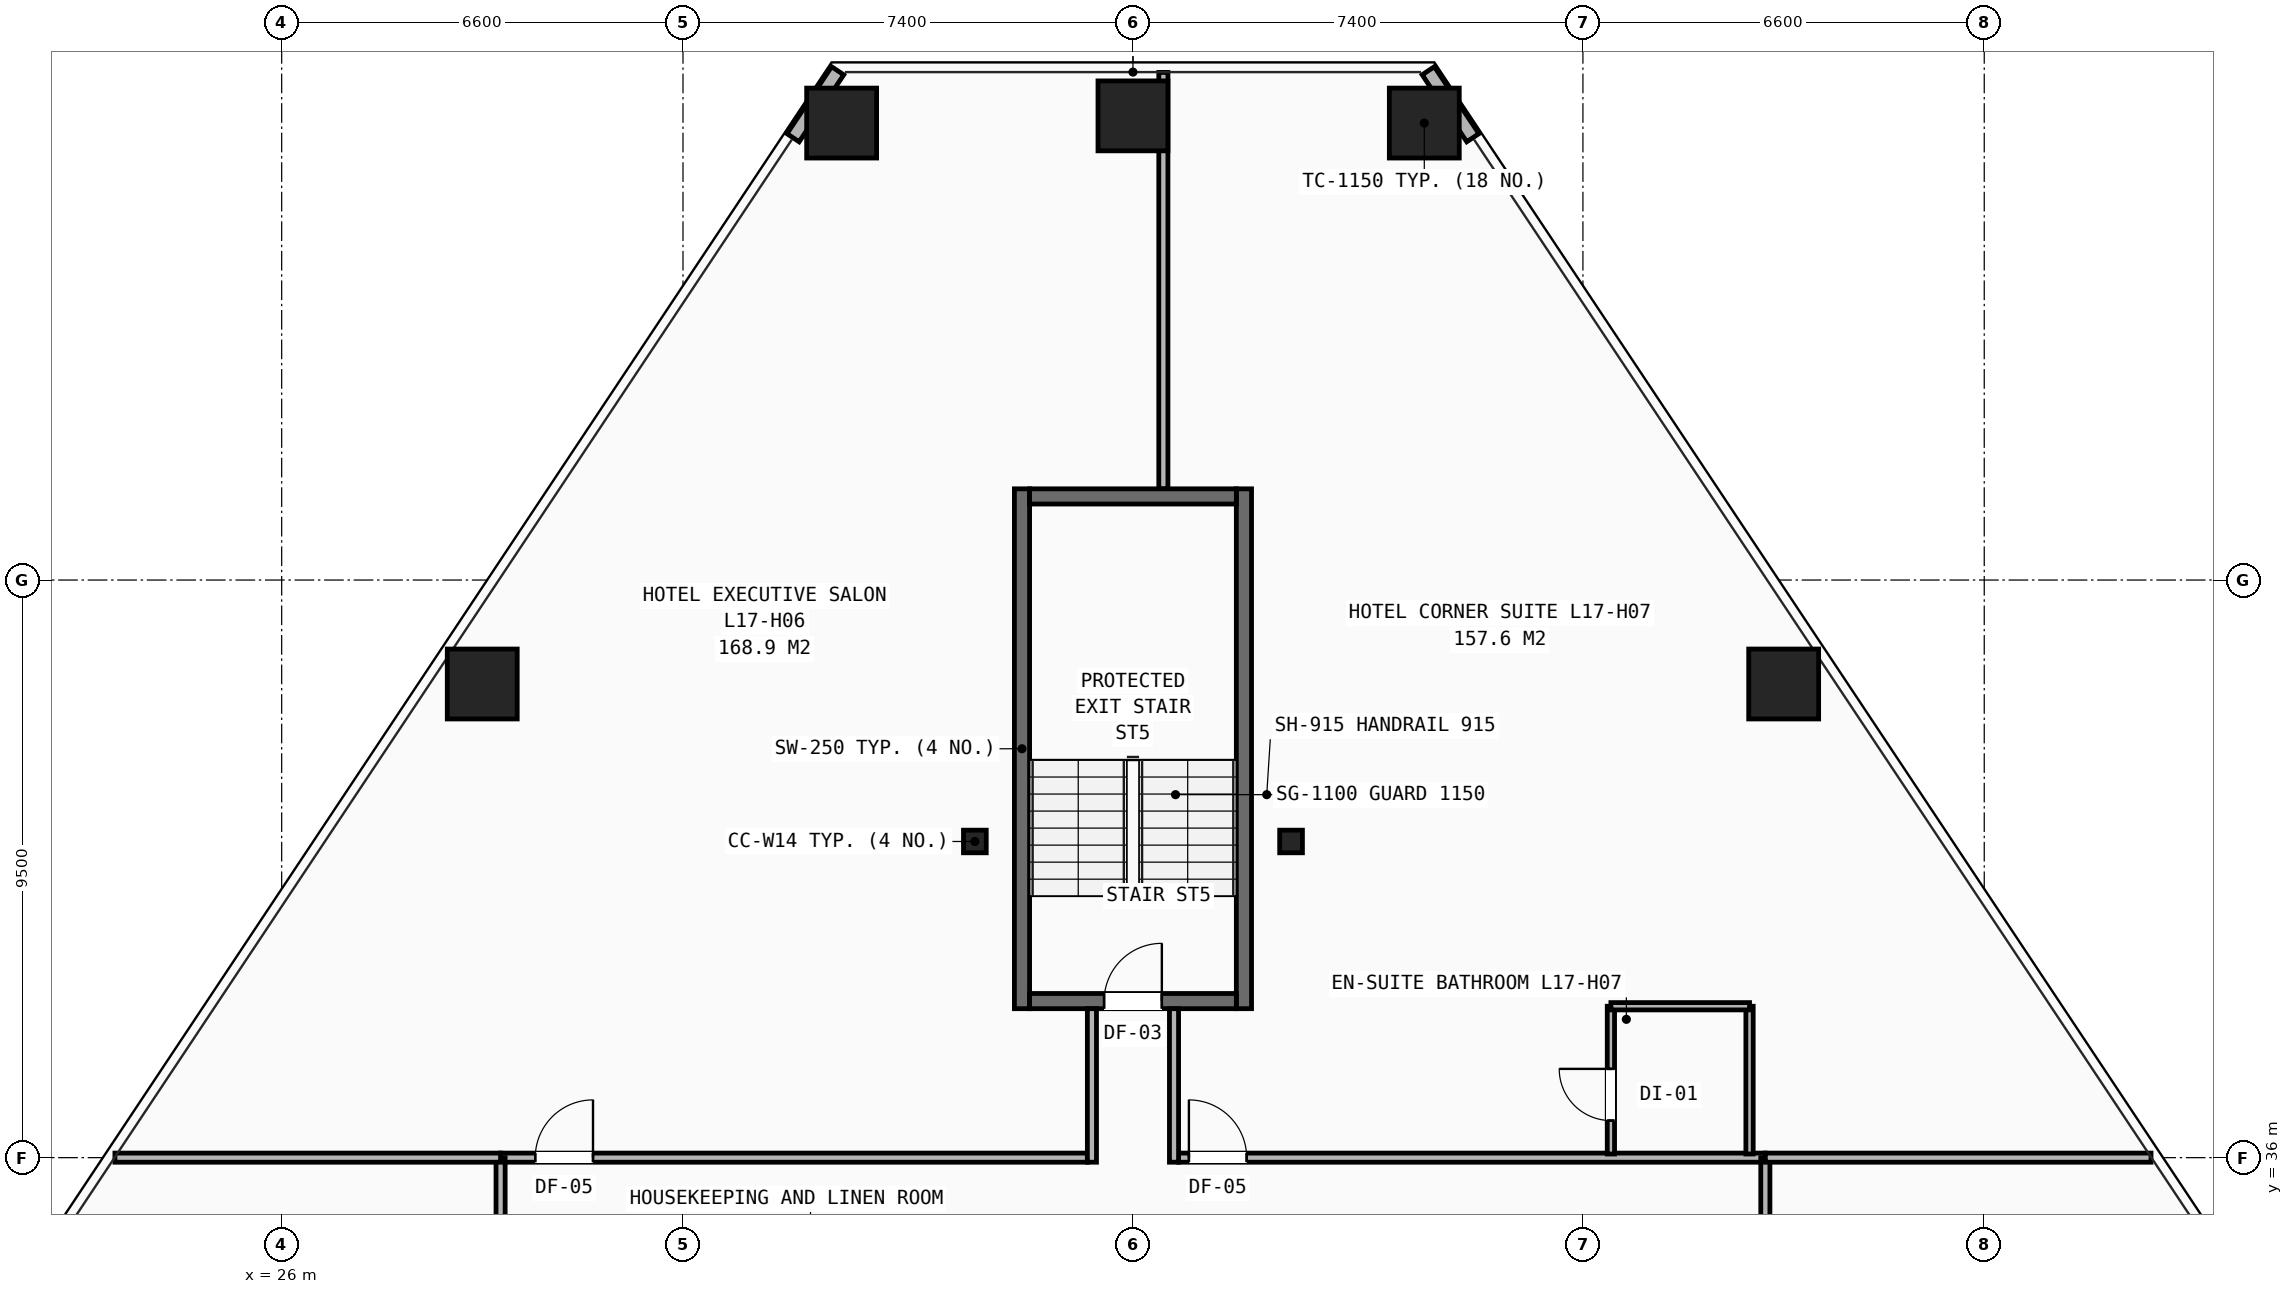
"""IFC4 building model, lengths in metres.
Left out: names, types, materials, properties, quantities, classifications, styles, units other than length and angle.
Written with IfcOpenShell. Run it as: python <this file> out.ifc"""

import sys

from ifc_helpers import new_model, si_unit, direction, frame, frame_2d, origin, origin_2d, place, context, subcontext, project, spatial, rectangle, hollow_rectangle, i_section, extrude, element, fill, save


model = new_model("IFC4")
c1 = context("Model", 3, precision=1e-05, world=origin(), true_north=direction((0.0, 1.0)))
c2 = subcontext(c1, "Body", "Model", "MODEL_VIEW")
j1 = project(units=[si_unit("LENGTHUNIT", "METRE"), si_unit("PLANEANGLEUNIT", "RADIAN")], contexts=[c1])
p1 = place(None, origin())
s1 = spatial("IfcSite", under=j1, at=p1, CompositionType="ELEMENT")
p2 = place(p1, origin())
s2 = spatial("IfcBuilding", under=s1, at=p2, CompositionType="ELEMENT")
p3 = place(p2, frame((0.0, 0.0, 62.4)))
s3 = spatial("IfcBuildingStorey", under=s2, at=p3, CompositionType="ELEMENT", Elevation=62.4)
for number, where, z_axis, x_axis in (
    (1, (37.4, 41.2, 0.0), (0.0, 0.0, 1.0), (1.0, 0.0, 0.0)),
    (2, (42.6, 41.2, 0.0), (0.0, 0.0, 1.0), (1.0, 0.0, 0.0)),
):
    element("IfcColumn", number, at=place(p3, frame(where, z_axis=z_axis, x_axis=x_axis)), inside=s3, PredefinedType="COLUMN", context=c2, shape_type="SweptSolid", body=[
        extrude(i_section(OverallWidth=0.374, OverallDepth=0.372, WebThickness=0.016, FlangeThickness=0.026, at=origin_2d()), origin(), (0.0, 0.0, 1.0), 3.2),
    ])
for number, where, z_axis, x_axis in (
    (3, (44.791, 53.016, 0.0), (0.0, 0.0, 1.0), (1.0, 0.0, 0.0)),
    (4, (40.0, 53.134, 0.0), (0.0, 0.0, 1.0), (1.0, 0.0, 0.0)),
    (5, (35.209, 53.016, 0.0), (0.0, 0.0, 1.0), (1.0, 0.0, 0.0)),
    (6, (29.299, 43.79, 0.0), (0.0, 0.0, 1.0), (1.0, 0.0, 0.0)),
    (7, (50.701, 43.79, 0.0), (0.0, 0.0, 1.0), (1.0, 0.0, 0.0)),
):
    element("IfcColumn", number, at=place(p3, frame(where, z_axis=z_axis, x_axis=x_axis)), inside=s3, PredefinedType="COLUMN", context=c2, shape_type="SweptSolid", body=[
        extrude(hollow_rectangle(XDim=1.15, YDim=1.15, WallThickness=0.075, at=origin_2d()), origin(), (0.0, 0.0, 1.0), 3.2),
    ])
for number, where, z_axis, x_axis in (
    (8, (35.144, 53.876, 0.0), (0.0, 0.0, 1.0), (-0.554, -0.833, 0.0)),
    (9, (45.59, 52.774, 0.0), (0.0, 0.0, 1.0), (-0.554, 0.833, 0.0)),
):
    element("IfcWall", number, at=place(p3, frame(where, z_axis=z_axis, x_axis=x_axis)), inside=s3, PredefinedType="SHEAR", context=c2, shape_type="SweptSolid", body=[
        extrude(rectangle(XDim=1.323, YDim=0.24, at=frame_2d((0.662, 0.0))), origin(), (0.0, 0.0, 1.0), 2.263),
    ])
p4 = place(p3, frame((29.6, 36.0, 0.0), z_axis=(0.0, 0.0, 1.0), x_axis=(1.0, 0.0, 0.0)))
e10 = element("IfcWall", 10, at=p4, inside=s3, PredefinedType="PARTITIONING", context=c2, shape_type="SweptSolid", body=[
    extrude(rectangle(XDim=9.65, YDim=0.15, at=frame_2d((4.825, 0.0))), origin(), (0.0, 0.0, 1.0), 2.98),
])
p5 = place(p4, frame((0.57, 0.0, 0.0)))
e11 = element("IfcOpeningElement", 11, at=p5, cuts=e10, PredefinedType="OPENING", context=c2, shape_type="SweptSolid", body=[
    extrude(rectangle(XDim=0.95, YDim=2.1, at=frame_2d((0.475, 1.05))), frame((0.0, 0.085, 0.0), z_axis=(0.0, -1.0, 0.0), x_axis=(1.0, 0.0, 0.0)), (0.0, 0.0, 1.0), 0.17),
])
p6 = place(p3, frame((40.75, 36.0, 0.0), z_axis=(0.0, 0.0, 1.0), x_axis=(1.0, 0.0, 0.0)))
e12 = element("IfcWall", 12, at=p6, inside=s3, PredefinedType="PARTITIONING", context=c2, shape_type="SweptSolid", body=[
    extrude(rectangle(XDim=9.65, YDim=0.15, at=frame_2d((4.825, 0.0))), origin(), (0.0, 0.0, 1.0), 2.513),
])
p7 = place(p6, frame((0.17, 0.0, 0.0)))
e13 = element("IfcOpeningElement", 13, at=p7, cuts=e12, PredefinedType="OPENING", context=c2, shape_type="SweptSolid", body=[
    extrude(rectangle(XDim=0.95, YDim=2.1, at=frame_2d((0.475, 1.05))), frame((0.0, 0.085, 0.0), z_axis=(0.0, -1.0, 0.0), x_axis=(1.0, 0.0, 0.0)), (0.0, 0.0, 1.0), 0.17),
])
p8 = place(p3, frame((29.6, 14.1, 0.0), z_axis=(0.0, 0.0, 1.0), x_axis=(0.0, 1.0, 0.0)))
e14 = element("IfcWall", 14, at=p8, inside=s3, PredefinedType="PARTITIONING", context=c2, shape_type="SweptSolid", body=[
    extrude(rectangle(XDim=21.9, YDim=0.15, at=frame_2d((10.95, 0.0))), origin(), (0.0, 0.0, 1.0), 2.431),
])
p9 = place(p8, frame((0.42, 0.0, 0.0)))
e15 = element("IfcOpeningElement", 15, at=p9, cuts=e14, PredefinedType="OPENING", context=c2, shape_type="SweptSolid", body=[
    extrude(rectangle(XDim=0.95, YDim=2.1, at=frame_2d((0.475, 1.05))), frame((0.0, 0.085, 0.0), z_axis=(0.0, -1.0, 0.0), x_axis=(1.0, 0.0, 0.0)), (0.0, 0.0, 1.0), 0.17),
])
p10 = place(p3, frame((50.4, 14.1, 0.0), z_axis=(0.0, 0.0, 1.0), x_axis=(0.0, 1.0, 0.0)))
e16 = element("IfcWall", 16, at=p10, inside=s3, PredefinedType="PARTITIONING", context=c2, shape_type="SweptSolid", body=[
    extrude(rectangle(XDim=21.9, YDim=0.15, at=frame_2d((10.95, 0.0))), origin(), (0.0, 0.0, 1.0), 2.431),
])
p11 = place(p10, frame((0.42, 0.0, 0.0)))
e17 = element("IfcOpeningElement", 17, at=p11, cuts=e16, PredefinedType="OPENING", context=c2, shape_type="SweptSolid", body=[
    extrude(rectangle(XDim=0.95, YDim=2.1, at=frame_2d((0.475, 1.05))), frame((0.0, 0.085, 0.0), z_axis=(0.0, -1.0, 0.0), x_axis=(1.0, 0.0, 0.0)), (0.0, 0.0, 1.0), 0.17),
])
p12 = place(p10, frame((11.32, 0.0, 0.0)))
e18 = element("IfcOpeningElement", 18, at=p12, cuts=e16, PredefinedType="OPENING", context=c2, shape_type="SweptSolid", body=[
    extrude(rectangle(XDim=0.95, YDim=2.1, at=frame_2d((0.475, 1.05))), frame((0.0, 0.085, 0.0), z_axis=(0.0, -1.0, 0.0), x_axis=(1.0, 0.0, 0.0)), (0.0, 0.0, 1.0), 0.17),
])
for number, where, z_axis, x_axis in (
    (19, (23.257, 36.0, 0.0), (0.0, 0.0, 1.0), (1.0, 0.0, 0.0)),
    (20, (50.4, 36.0, 0.0), (0.0, 0.0, 1.0), (1.0, 0.0, 0.0)),
):
    element("IfcWall", number, at=place(p3, frame(where, z_axis=z_axis, x_axis=x_axis)), inside=s3, PredefinedType="PARTITIONING", context=c2, shape_type="SweptSolid", body=[
        extrude(rectangle(XDim=6.343, YDim=0.15, at=frame_2d((3.171, 0.0))), origin(), (0.0, 0.0, 1.0), 2.268),
    ])
p13 = place(p3, frame((40.5, 47.0, 0.0), z_axis=(0.0, 0.0, 1.0), x_axis=(0.0, 1.0, 0.0)))
e21 = element("IfcWall", 21, at=p13, inside=s3, PredefinedType="PARTITIONING", context=c2, shape_type="SweptSolid", body=[
    extrude(rectangle(XDim=6.849, YDim=0.15, at=frame_2d((3.425, 0.0))), origin(), (0.0, 0.0, 1.0), 2.268),
])
p14 = place(p3, frame((47.86, 36.06, 0.0), z_axis=(0.0, 0.0, 1.0), x_axis=(0.0, 1.0, 0.0)))
e22 = element("IfcWall", 22, at=p14, inside=s3, PredefinedType="PARTITIONING", context=c2, shape_type="SweptSolid", body=[
    extrude(rectangle(XDim=2.43, YDim=0.12, at=frame_2d((1.215, 0.0))), origin(), (0.0, 0.0, 1.0), 2.98),
])
p15 = place(p14, frame((0.55, 0.0, 0.0)))
e23 = element("IfcOpeningElement", 23, at=p15, cuts=e22, PredefinedType="OPENING", context=c2, shape_type="SweptSolid", body=[
    extrude(rectangle(XDim=0.85, YDim=2.05, at=frame_2d((0.425, 1.025))), frame((0.0, 0.07, 0.0), z_axis=(0.0, -1.0, 0.0), x_axis=(1.0, 0.0, 0.0)), (0.0, 0.0, 1.0), 0.14),
])
p16 = place(p3, frame((50.14, 36.06, 0.0), z_axis=(0.0, 0.0, 1.0), x_axis=(0.0, 1.0, 0.0)))
e24 = element("IfcWall", 24, at=p16, inside=s3, PredefinedType="PARTITIONING", context=c2, shape_type="SweptSolid", body=[
    extrude(rectangle(XDim=2.43, YDim=0.12, at=frame_2d((1.215, 0.0))), origin(), (0.0, 0.0, 1.0), 2.513),
])
p17 = place(p3, frame((47.86, 38.49, 0.0), z_axis=(0.0, 0.0, 1.0), x_axis=(1.0, 0.0, 0.0)))
e25 = element("IfcWall", 25, at=p17, inside=s3, PredefinedType="PARTITIONING", context=c2, shape_type="SweptSolid", body=[
    extrude(rectangle(XDim=2.28, YDim=0.12, at=frame_2d((1.14, 0.0))), origin(), (0.0, 0.0, 1.0), 2.513),
])
for number, where, z_axis, x_axis in (
    (26, (38.175, 38.45, 0.0), (0.0, 0.0, 1.0), (0.0, 1.0, 0.0)),
    (27, (41.825, 38.45, 0.0), (0.0, 0.0, 1.0), (0.0, 1.0, 0.0)),
):
    element("IfcWall", number, at=place(p3, frame(where, z_axis=z_axis, x_axis=x_axis)), inside=s3, PredefinedType="SHEAR", context=c2, shape_type="SweptSolid", body=[
        extrude(rectangle(XDim=8.55, YDim=0.25, at=frame_2d((4.275, 0.0))), origin(), (0.0, 0.0, 1.0), 2.98),
    ])
p18 = place(p3, frame((38.3, 38.575, 0.0), z_axis=(0.0, 0.0, 1.0), x_axis=(1.0, 0.0, 0.0)))
e28 = element("IfcWall", 28, at=p18, inside=s3, PredefinedType="SHEAR", context=c2, shape_type="SweptSolid", body=[
    extrude(rectangle(XDim=3.4, YDim=0.25, at=frame_2d((1.7, 0.0))), origin(), (0.0, 0.0, 1.0), 2.98),
])
p19 = place(p18, frame((1.225, 0.0, 0.0)))
e29 = element("IfcOpeningElement", 29, at=p19, cuts=e28, PredefinedType="OPENING", context=c2, shape_type="SweptSolid", body=[
    extrude(rectangle(XDim=0.95, YDim=2.1, at=frame_2d((0.475, 1.05))), frame((0.0, 0.135, 0.0), z_axis=(0.0, -1.0, 0.0), x_axis=(1.0, 0.0, 0.0)), (0.0, 0.0, 1.0), 0.27),
])
p20 = place(p3, frame((38.3, 46.875, 0.0), z_axis=(0.0, 0.0, 1.0), x_axis=(1.0, 0.0, 0.0)))
e30 = element("IfcWall", 30, at=p20, inside=s3, PredefinedType="SHEAR", context=c2, shape_type="SweptSolid", body=[
    extrude(rectangle(XDim=3.4, YDim=0.25, at=frame_2d((1.7, 0.0))), origin(), (0.0, 0.0, 1.0), 2.98),
])
for number, where, z_axis, x_axis in (
    (31, (39.325, 35.925, 0.0), (0.0, 0.0, 1.0), (0.0, 1.0, 0.0)),
    (32, (40.675, 35.925, 0.0), (0.0, 0.0, 1.0), (0.0, 1.0, 0.0)),
):
    element("IfcWall", number, at=place(p3, frame(where, z_axis=z_axis, x_axis=x_axis)), inside=s3, PredefinedType="PARTITIONING", context=c2, shape_type="SweptSolid", body=[
        extrude(rectangle(XDim=2.525, YDim=0.15, at=frame_2d((1.262, 0.0))), origin(), (0.0, 0.0, 1.0), 2.98),
    ])
p21 = place(p5, origin())
e33 = element("IfcDoor", 33, at=p21, inside=s3, OperationType="SINGLE_SWING_RIGHT", PredefinedType="DOOR", context=c2, shape_type="SweptSolid", body=[
    extrude(rectangle(XDim=0.95, YDim=2.1, at=frame_2d((0.475, 1.05))), frame((0.0, 0.025, 0.0), z_axis=(0.0, -1.0, 0.0), x_axis=(1.0, 0.0, 0.0)), (0.0, 0.0, 1.0), 0.05),
])
fill(e11, e33)
p22 = place(p7, origin())
e34 = element("IfcDoor", 34, at=p22, inside=s3, OperationType="SINGLE_SWING_LEFT", PredefinedType="DOOR", context=c2, shape_type="SweptSolid", body=[
    extrude(rectangle(XDim=0.95, YDim=2.1, at=frame_2d((0.475, 1.05))), frame((0.0, 0.025, 0.0), z_axis=(0.0, -1.0, 0.0), x_axis=(1.0, 0.0, 0.0)), (0.0, 0.0, 1.0), 0.05),
])
fill(e13, e34)
p23 = place(p15, origin())
e35 = element("IfcDoor", 35, at=p23, inside=s3, OperationType="SINGLE_SWING_RIGHT", PredefinedType="DOOR", context=c2, shape_type="SweptSolid", body=[
    extrude(rectangle(XDim=0.85, YDim=2.05, at=frame_2d((0.425, 1.025))), frame((0.0, 0.025, 0.0), z_axis=(0.0, -1.0, 0.0), x_axis=(1.0, 0.0, 0.0)), (0.0, 0.0, 1.0), 0.05),
])
fill(e23, e35)
p24 = place(p19, origin())
e36 = element("IfcDoor", 36, at=p24, inside=s3, OperationType="SINGLE_SWING_RIGHT", PredefinedType="DOOR", context=c2, shape_type="SweptSolid", body=[
    extrude(rectangle(XDim=0.95, YDim=2.1, at=frame_2d((0.475, 1.05))), frame((0.0, 0.025, 0.0), z_axis=(0.0, -1.0, 0.0), x_axis=(1.0, 0.0, 0.0)), (0.0, 0.0, 1.0), 0.05),
])
fill(e29, e36)
save(model, sys.argv[1])
